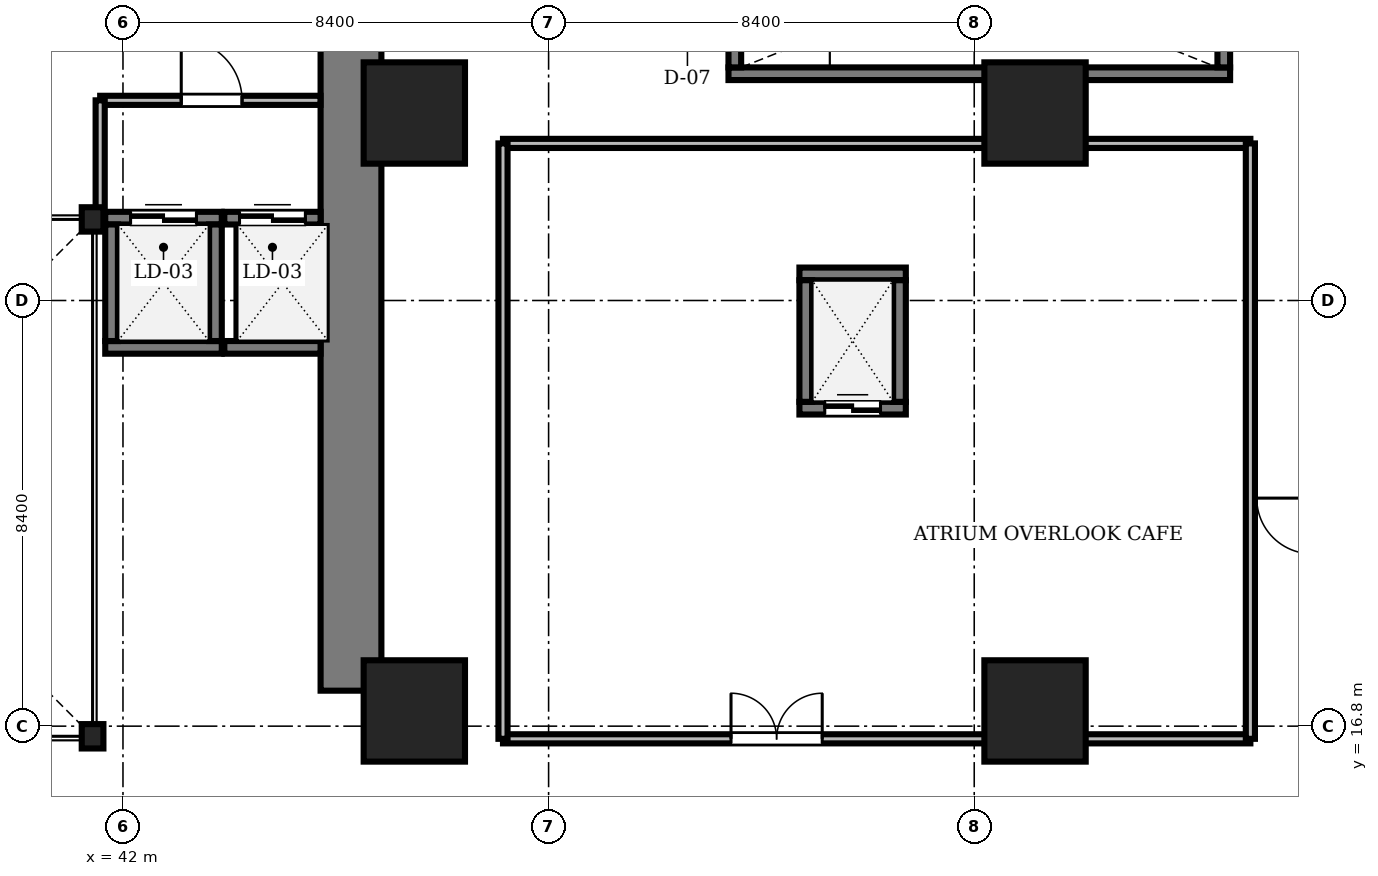
"""IFC4 building model, lengths in metres.
Left out: names, types, materials, properties, quantities, classifications, styles, units other than length and angle.
Written with IfcOpenShell. Run it as: python <this file> out.ifc"""

import sys

from ifc_helpers import new_model, si_unit, direction, frame, frame_2d, origin, origin_2d, place, context, subcontext, project, spatial, rectangle, i_section, extrude, source, transform, mapped, element, fill, save


model = new_model("IFC4")
c1 = context("Model", 3, precision=1e-05, world=origin(), true_north=direction((0.0, 1.0)))
c2 = subcontext(c1, "Body", "Model", "MODEL_VIEW")
j1 = project(units=[si_unit("LENGTHUNIT", "METRE"), si_unit("PLANEANGLEUNIT", "RADIAN")], contexts=[c1])
p1 = place(None, origin())
s1 = spatial("IfcSite", under=j1, at=p1, CompositionType="ELEMENT")
p2 = place(p1, origin())
s2 = spatial("IfcBuilding", under=s1, at=p2, CompositionType="ELEMENT")
p3 = place(p2, frame((0.0, 0.0, 6.0)))
s3 = spatial("IfcBuildingStorey", under=s2, at=p3, CompositionType="ELEMENT", Elevation=6.0)
m1 = source(origin(), c2, "Body", "SweptSolid", [
    extrude(rectangle(XDim=13.15, YDim=1.2, at=frame_2d((6.575, 0.0))), origin(), (0.0, 0.0, 1.0), 5.0),
])
p4 = place(p3, frame((46.5, 17.5, 0.0), z_axis=(0.0, 0.0, 1.0), x_axis=(0.0, 1.0, 0.0)))
e1 = element("IfcWall", 1, at=p4, inside=s3, PredefinedType="SHEAR", context=c2, shape_type="MappedRepresentation", body=[
    mapped(m1, transform((0.0, 0.0, 0.0), scale=1.0)),
])
m2 = source(origin(), c2, "Body", "SweptSolid", [
    extrude(i_section(OverallWidth=0.428, OverallDepth=0.481, WebThickness=0.04, FlangeThickness=0.063, FilletRadius=0.015, at=origin_2d()), origin(), (0.0, 0.0, 1.0), 5.0),
])
for number, where, z_axis, x_axis in (
    (2, (41.4, 16.6, 0.0), (0.0, 0.0, 1.0), (1.0, 0.0, 0.0)),
    (3, (41.4, 26.8, 0.0), (0.0, 0.0, 1.0), (1.0, 0.0, 0.0)),
):
    element("IfcColumn", number, at=place(p3, frame(where, z_axis=z_axis, x_axis=x_axis)), inside=s3, PredefinedType="COLUMN", context=c2, shape_type="MappedRepresentation", body=[
        mapped(m2, transform((0.0, 0.0, 0.0), scale=1.0)),
    ])
m3 = source(origin(), c2, "Body", "SweptSolid", [
    extrude(rectangle(XDim=2.0, YDim=2.0, at=origin_2d()), origin(), (0.0, 0.0, 1.0), 5.0),
])
for number, where, z_axis, x_axis in (
    (4, (47.75, 17.1, 0.0), (0.0, 0.0, 1.0), (1.0, 0.0, 0.0)),
    (5, (60.0, 17.1, 0.0), (0.0, 0.0, 1.0), (1.0, 0.0, 0.0)),
    (6, (47.75, 28.9, 0.0), (0.0, 0.0, 1.0), (1.0, 0.0, 0.0)),
    (7, (60.0, 28.9, 0.0), (0.0, 0.0, 1.0), (1.0, 0.0, 0.0)),
):
    element("IfcColumn", number, at=place(p3, frame(where, z_axis=z_axis, x_axis=x_axis)), inside=s3, PredefinedType="COLUMN", context=c2, shape_type="MappedRepresentation", body=[
        mapped(m3, transform((0.0, 0.0, 0.0), scale=1.0)),
    ])
m4 = source(origin(), c2, "Body", "SweptSolid", [
    extrude(rectangle(XDim=9.9, YDim=0.25, at=frame_2d((4.95, 0.0))), origin(), (0.0, 0.0, 1.0), 5.0),
])
p5 = place(p3, frame((53.95, 29.675, 0.0), z_axis=(0.0, 0.0, 1.0), x_axis=(1.0, 0.0, 0.0)))
e8 = element("IfcWall", 8, at=p5, inside=s3, PredefinedType="SOLIDWALL", context=c2, shape_type="MappedRepresentation", body=[
    mapped(m4, transform((0.0, 0.0, 0.0), scale=1.0)),
])
m5 = source(origin(), c2, "Body", "SweptSolid", [
    extrude(rectangle(XDim=3.75, YDim=0.25, at=frame_2d((1.875, 0.0))), origin(), (0.0, 0.0, 1.0), 5.0),
])
p6 = place(p3, frame((63.725, 29.8, 0.0), z_axis=(0.0, 0.0, 1.0), x_axis=(0.0, 1.0, 0.0)))
e9 = element("IfcWall", 9, at=p6, inside=s3, PredefinedType="SOLIDWALL", context=c2, shape_type="MappedRepresentation", body=[
    mapped(m5, transform((0.0, 0.0, 0.0), scale=1.0)),
])
p7 = place(p3, frame((54.075, 29.8, 0.0), z_axis=(0.0, 0.0, 1.0), x_axis=(0.0, 1.0, 0.0)))
e10 = element("IfcWall", 10, at=p7, inside=s3, PredefinedType="SOLIDWALL", context=c2, shape_type="MappedRepresentation", body=[
    mapped(m5, transform((0.0, 0.0, 0.0), scale=1.0)),
])
m6 = source(origin(), c2, "Body", "SweptSolid", [
    extrude(rectangle(XDim=1.1, YDim=2.2, at=frame_2d((0.55, 1.1))), frame((0.0, 0.135, 0.0), z_axis=(0.0, -1.0, 0.0), x_axis=(1.0, 0.0, 0.0)), (0.0, 0.0, 1.0), 0.27),
])
p8 = place(p7, frame((2.3, 0.0, 0.0)))
e11 = element("IfcOpeningElement", 11, at=p8, cuts=e10, PredefinedType="OPENING", context=c2, shape_type="MappedRepresentation", body=[
    mapped(m6, transform((0.0, 0.0, 0.0), scale=1.0)),
])
m7 = source(origin(), c2, "Body", "SweptSolid", [
    extrude(rectangle(XDim=2.1, YDim=0.25, at=frame_2d((1.05, 0.0))), origin(), (0.0, 0.0, 1.0), 5.0),
])
p9 = place(p3, frame((55.35, 23.075, 0.0), z_axis=(0.0, 0.0, 1.0), x_axis=(1.0, 0.0, 0.0)))
e12 = element("IfcWall", 12, at=p9, inside=s3, PredefinedType="SOLIDWALL", context=c2, shape_type="MappedRepresentation", body=[
    mapped(m7, transform((0.0, 0.0, 0.0), scale=1.0)),
])
p10 = place(p9, frame((0.5, 0.0, 0.0)))
e13 = element("IfcOpeningElement", 13, at=p10, cuts=e12, PredefinedType="OPENING", context=c2, shape_type="MappedRepresentation", body=[
    mapped(m6, transform((0.0, 0.0, 0.0), scale=1.0)),
])
p11 = place(p3, frame((55.35, 25.725, 0.0), z_axis=(0.0, 0.0, 1.0), x_axis=(1.0, 0.0, 0.0)))
e14 = element("IfcWall", 14, at=p11, inside=s3, PredefinedType="SOLIDWALL", context=c2, shape_type="MappedRepresentation", body=[
    mapped(m7, transform((0.0, 0.0, 0.0), scale=1.0)),
])
m8 = source(origin(), c2, "Body", "SweptSolid", [
    extrude(rectangle(XDim=2.4, YDim=0.25, at=frame_2d((1.2, 0.0))), origin(), (0.0, 0.0, 1.0), 5.0),
])
for number, where, z_axis, x_axis in (
    (15, (55.475, 23.2, 0.0), (0.0, 0.0, 1.0), (0.0, 1.0, 0.0)),
    (16, (57.325, 23.2, 0.0), (0.0, 0.0, 1.0), (0.0, 1.0, 0.0)),
):
    element("IfcWall", number, at=place(p3, frame(where, z_axis=z_axis, x_axis=x_axis)), inside=s3, PredefinedType="SOLIDWALL", context=c2, shape_type="MappedRepresentation", body=[
        mapped(m8, transform((0.0, 0.0, 0.0), scale=1.0)),
    ])
m9 = source(origin(), c2, "Body", "SweptSolid", [
    extrude(rectangle(XDim=2.3, YDim=0.25, at=frame_2d((1.15, 0.0))), origin(), (0.0, 0.0, 1.0), 5.0),
])
p12 = place(p3, frame((41.65, 24.275, 0.0), z_axis=(0.0, 0.0, 1.0), x_axis=(1.0, 0.0, 0.0)))
e17 = element("IfcWall", 17, at=p12, inside=s3, PredefinedType="SOLIDWALL", context=c2, shape_type="MappedRepresentation", body=[
    mapped(m9, transform((0.0, 0.0, 0.0), scale=1.0)),
])
p13 = place(p3, frame((41.65, 26.825, 0.0), z_axis=(0.0, 0.0, 1.0), x_axis=(1.0, 0.0, 0.0)))
e18 = element("IfcWall", 18, at=p13, inside=s3, PredefinedType="SOLIDWALL", context=c2, shape_type="MappedRepresentation", body=[
    mapped(m9, transform((0.0, 0.0, 0.0), scale=1.0)),
])
m10 = source(origin(), c2, "Body", "SweptSolid", [
    extrude(rectangle(XDim=1.3, YDim=2.3, at=frame_2d((0.65, 1.15))), frame((0.0, 0.135, 0.0), z_axis=(0.0, -1.0, 0.0), x_axis=(1.0, 0.0, 0.0)), (0.0, 0.0, 1.0), 0.27),
])
p14 = place(p13, frame((0.5, 0.0, 0.0)))
e19 = element("IfcOpeningElement", 19, at=p14, cuts=e18, PredefinedType="OPENING", context=c2, shape_type="MappedRepresentation", body=[
    mapped(m10, transform((0.0, 0.0, 0.0), scale=1.0)),
])
for number, where, z_axis, x_axis in (
    (20, (41.775, 24.4, 0.0), (0.0, 0.0, 1.0), (0.0, 1.0, 0.0)),
    (21, (43.825, 24.4, 0.0), (0.0, 0.0, 1.0), (0.0, 1.0, 0.0)),
):
    element("IfcWall", number, at=place(p3, frame(where, z_axis=z_axis, x_axis=x_axis)), inside=s3, PredefinedType="SOLIDWALL", context=c2, shape_type="MappedRepresentation", body=[
        mapped(m9, transform((0.0, 0.0, 0.0), scale=1.0)),
    ])
m11 = source(origin(), c2, "Body", "SweptSolid", [
    extrude(rectangle(XDim=1.9, YDim=0.25, at=frame_2d((0.95, 0.0))), origin(), (0.0, 0.0, 1.0), 5.0),
])
p15 = place(p3, frame((44.0, 24.275, 0.0), z_axis=(0.0, 0.0, 1.0), x_axis=(1.0, 0.0, 0.0)))
e22 = element("IfcWall", 22, at=p15, inside=s3, PredefinedType="SOLIDWALL", context=c2, shape_type="MappedRepresentation", body=[
    mapped(m11, transform((0.0, 0.0, 0.0), scale=1.0)),
])
p16 = place(p3, frame((44.0, 26.825, 0.0), z_axis=(0.0, 0.0, 1.0), x_axis=(1.0, 0.0, 0.0)))
e23 = element("IfcWall", 23, at=p16, inside=s3, PredefinedType="SOLIDWALL", context=c2, shape_type="MappedRepresentation", body=[
    mapped(m11, transform((0.0, 0.0, 0.0), scale=1.0)),
])
p17 = place(p16, frame((0.3, 0.0, 0.0)))
e24 = element("IfcOpeningElement", 24, at=p17, cuts=e23, PredefinedType="OPENING", context=c2, shape_type="MappedRepresentation", body=[
    mapped(m10, transform((0.0, 0.0, 0.0), scale=1.0)),
])
m12 = source(origin(), c2, "Body", "SweptSolid", [
    extrude(rectangle(XDim=14.75, YDim=0.18, at=frame_2d((7.375, 0.0))), origin(), (0.0, 0.0, 1.0), 4.392),
])
p18 = place(p3, frame((49.5, 16.55, 0.0), z_axis=(0.0, 0.0, 1.0), x_axis=(1.0, 0.0, 0.0)))
e25 = element("IfcWall", 25, at=p18, inside=s3, PredefinedType="PARTITIONING", context=c2, shape_type="MappedRepresentation", body=[
    mapped(m12, transform((0.0, 0.0, 0.0), scale=1.0)),
])
m13 = source(origin(), c2, "Body", "SweptSolid", [
    extrude(rectangle(XDim=1.8, YDim=2.4, at=frame_2d((0.9, 1.2))), frame((0.0, 0.1, 0.0), z_axis=(0.0, -1.0, 0.0), x_axis=(1.0, 0.0, 0.0)), (0.0, 0.0, 1.0), 0.2),
])
p19 = place(p18, frame((4.5, 0.0, 0.0)))
e26 = element("IfcOpeningElement", 26, at=p19, cuts=e25, PredefinedType="OPENING", context=c2, shape_type="MappedRepresentation", body=[
    mapped(m13, transform((0.0, 0.0, 0.0), scale=1.0)),
])
m14 = source(origin(), c2, "Body", "SweptSolid", [
    extrude(rectangle(XDim=4.348, YDim=0.18, at=frame_2d((2.174, 0.0))), origin(), (0.0, 0.0, 1.0), 5.0),
])
p20 = place(p3, frame((41.55, 29.15, 0.0), z_axis=(0.0, 0.0, 1.0), x_axis=(1.0, 0.0, 0.0)))
e27 = element("IfcWall", 27, at=p20, inside=s3, PredefinedType="PARTITIONING", context=c2, shape_type="MappedRepresentation", body=[
    mapped(m14, transform((0.0, 0.0, 0.0), scale=1.0)),
])
m15 = source(origin(), c2, "Body", "SweptSolid", [
    extrude(rectangle(XDim=1.2, YDim=2.2, at=frame_2d((0.6, 1.1))), frame((0.0, 0.1, 0.0), z_axis=(0.0, -1.0, 0.0), x_axis=(1.0, 0.0, 0.0)), (0.0, 0.0, 1.0), 0.2),
])
p21 = place(p20, frame((1.6, 0.0, 0.0)))
e28 = element("IfcOpeningElement", 28, at=p21, cuts=e27, PredefinedType="OPENING", context=c2, shape_type="MappedRepresentation", body=[
    mapped(m15, transform((0.0, 0.0, 0.0), scale=1.0)),
])
p22 = place(p3, frame((49.5, 28.3, 0.0), z_axis=(0.0, 0.0, 1.0), x_axis=(1.0, 0.0, 0.0)))
e29 = element("IfcWall", 29, at=p22, inside=s3, PredefinedType="PARTITIONING", context=c2, shape_type="MappedRepresentation", body=[
    mapped(m12, transform((0.0, 0.0, 0.0), scale=1.0)),
])
m16 = source(origin(), c2, "Body", "SweptSolid", [
    extrude(rectangle(XDim=11.75, YDim=0.18, at=frame_2d((5.875, 0.0))), origin(), (0.0, 0.0, 1.0), 4.468),
])
for number, where, z_axis, x_axis in (
    (30, (49.5, 16.55, 0.0), (0.0, 0.0, 1.0), (0.0, 1.0, 0.0)),
    (31, (64.25, 16.55, 0.0), (0.0, 0.0, 1.0), (0.0, 1.0, 0.0)),
):
    element("IfcWall", number, at=place(p3, frame(where, z_axis=z_axis, x_axis=x_axis)), inside=s3, PredefinedType="PARTITIONING", context=c2, shape_type="MappedRepresentation", body=[
        mapped(m16, transform((0.0, 0.0, 0.0), scale=1.0)),
    ])
m17 = source(origin(), c2, "Body", "SweptSolid", [
    extrude(rectangle(XDim=2.35, YDim=0.18, at=frame_2d((1.175, 0.0))), origin(), (0.0, 0.0, 1.0), 5.0),
])
p23 = place(p3, frame((41.55, 26.8, 0.0), z_axis=(0.0, 0.0, 1.0), x_axis=(0.0, 1.0, 0.0)))
e32 = element("IfcWall", 32, at=p23, inside=s3, PredefinedType="PARTITIONING", context=c2, shape_type="MappedRepresentation", body=[
    mapped(m17, transform((0.0, 0.0, 0.0), scale=1.0)),
])
m18 = source(origin(), c2, "Body", "SweptSolid", [
    extrude(rectangle(XDim=1.1, YDim=2.2, at=frame_2d((0.55, 1.1))), frame((0.0, 0.025, 0.0), z_axis=(0.0, -1.0, 0.0), x_axis=(1.0, 0.0, 0.0)), (0.0, 0.0, 1.0), 0.05),
])
p24 = place(p10, origin())
e33 = element("IfcDoor", 33, at=p24, inside=s3, OperationType="DOUBLE_DOOR_SLIDING", PredefinedType="DOOR", context=c2, shape_type="MappedRepresentation", body=[
    mapped(m18, transform((0.0, 0.0, 0.0), scale=1.0)),
])
fill(e13, e33)
m19 = source(origin(), c2, "Body", "SweptSolid", [
    extrude(rectangle(XDim=1.3, YDim=2.3, at=frame_2d((0.65, 1.15))), frame((0.0, 0.025, 0.0), z_axis=(0.0, -1.0, 0.0), x_axis=(1.0, 0.0, 0.0)), (0.0, 0.0, 1.0), 0.05),
])
p25 = place(p14, origin())
e34 = element("IfcDoor", 34, at=p25, inside=s3, OperationType="DOUBLE_DOOR_SLIDING", PredefinedType="DOOR", context=c2, shape_type="MappedRepresentation", body=[
    mapped(m19, transform((0.0, 0.0, 0.0), scale=1.0)),
])
fill(e19, e34)
p26 = place(p17, origin())
e35 = element("IfcDoor", 35, at=p26, inside=s3, OperationType="DOUBLE_DOOR_SLIDING", PredefinedType="DOOR", context=c2, shape_type="MappedRepresentation", body=[
    mapped(m19, transform((0.0, 0.0, 0.0), scale=1.0)),
])
fill(e24, e35)
m20 = source(origin(), c2, "Body", "SweptSolid", [
    extrude(rectangle(XDim=1.8, YDim=2.4, at=frame_2d((0.9, 1.2))), frame((0.0, 0.025, 0.0), z_axis=(0.0, -1.0, 0.0), x_axis=(1.0, 0.0, 0.0)), (0.0, 0.0, 1.0), 0.05),
])
p27 = place(p19, origin())
e36 = element("IfcDoor", 36, at=p27, inside=s3, OperationType="DOUBLE_DOOR_SINGLE_SWING", PredefinedType="DOOR", context=c2, shape_type="MappedRepresentation", body=[
    mapped(m20, transform((0.0, 0.0, 0.0), scale=1.0)),
])
fill(e26, e36)
m21 = source(origin(), c2, "Body", "SweptSolid", [
    extrude(rectangle(XDim=1.2, YDim=2.2, at=frame_2d((0.6, 1.1))), frame((0.0, 0.025, 0.0), z_axis=(0.0, -1.0, 0.0), x_axis=(1.0, 0.0, 0.0)), (0.0, 0.0, 1.0), 0.05),
])
p28 = place(p21, origin())
e37 = element("IfcDoor", 37, at=p28, inside=s3, OperationType="SINGLE_SWING_LEFT", PredefinedType="DOOR", context=c2, shape_type="MappedRepresentation", body=[
    mapped(m21, transform((0.0, 0.0, 0.0), scale=1.0)),
])
fill(e28, e37)
save(model, sys.argv[1])
